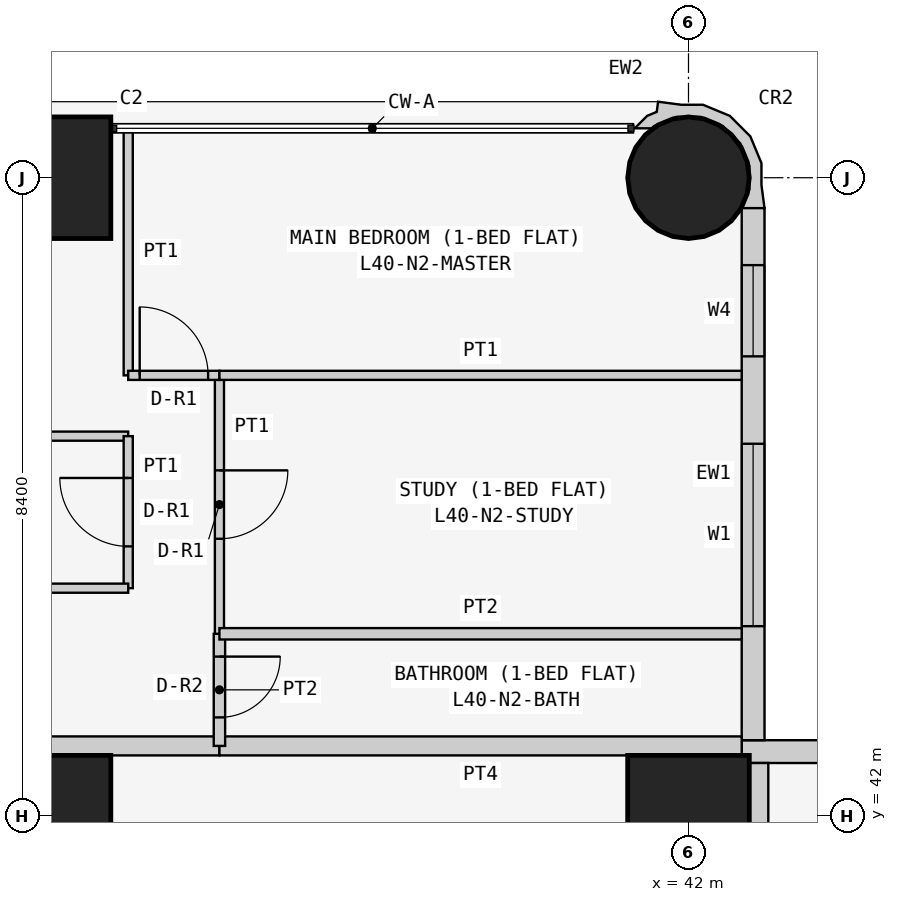
"""IFC4 building model, lengths in metres.
Left out: names, types, materials, properties, quantities, classifications, styles, units other than length and angle.
Written with IfcOpenShell. Run it as: python <this file> out.ifc"""

import sys

from ifc_helpers import new_model, si_unit, direction, frame, frame_2d, origin, origin_2d, place, context, subcontext, project, spatial, polyline, rectangle, circle, outline, extrude, element, fill, save


model = new_model("IFC4")
c1 = context("Model", 3, precision=1e-05, world=origin(), true_north=direction((0.0, 1.0)))
c2 = subcontext(c1, "Body", "Model", "MODEL_VIEW")
j1 = project(units=[si_unit("LENGTHUNIT", "METRE"), si_unit("PLANEANGLEUNIT", "RADIAN")], contexts=[c1])
p1 = place(None, origin())
s1 = spatial("IfcSite", under=j1, at=p1, CompositionType="ELEMENT")
p2 = place(p1, origin())
s2 = spatial("IfcBuilding", under=s1, at=p2, CompositionType="ELEMENT")
p3 = place(p2, frame((0.0, 0.0, 155.7)))
s3 = spatial("IfcBuildingStorey", under=s2, at=p3, CompositionType="ELEMENT", Elevation=155.7)
for number, where, z_axis, x_axis in (
    (1, (33.6, 42.0, 0.0), (0.0, 0.0, 1.0), (1.0, 0.0, 0.0)),
    (2, (33.6, 50.4, 0.0), (0.0, 0.0, 1.0), (1.0, 0.0, 0.0)),
    (3, (42.0, 42.0, 0.0), (0.0, 0.0, 1.0), (1.0, 0.0, 0.0)),
):
    element("IfcColumn", number, at=place(p3, frame(where, z_axis=z_axis, x_axis=x_axis)), inside=s3, PredefinedType="COLUMN", context=c2, shape_type="SweptSolid", body=[
        extrude(rectangle(XDim=1.6, YDim=1.6, at=origin_2d()), origin(), (0.0, 0.0, 1.0), 3.6),
    ])
p4 = place(p3, frame((42.0, 50.4, 0.0), z_axis=(0.0, 0.0, 1.0), x_axis=(1.0, 0.0, 0.0)))
e4 = element("IfcColumn", 4, at=p4, inside=s3, PredefinedType="COLUMN", context=c2, shape_type="SweptSolid", body=[
    extrude(circle(Radius=0.8, at=origin_2d()), origin(), (0.0, 0.0, 1.0), 3.6),
])
p5 = place(p3, frame((58.4, 42.85, 0.0), z_axis=(0.0, 0.0, 1.0), x_axis=(-1.0, 0.0, 0.0)))
e5 = element("IfcWall", 5, at=p5, inside=s3, PredefinedType="SOLIDWALL", context=c2, shape_type="SweptSolid", body=[
    extrude(rectangle(XDim=15.7, YDim=0.3, at=frame_2d((7.85, 0.0))), origin(), (0.0, 0.0, 1.0), 3.45),
])
p6 = place(p5, frame((12.4, 0.0, 0.9)))
e6 = element("IfcOpeningElement", 6, at=p6, cuts=e5, PredefinedType="OPENING", context=c2, shape_type="SweptSolid", body=[
    extrude(rectangle(XDim=1.8, YDim=1.5, at=frame_2d((0.9, 0.75))), frame((0.0, 0.16, 0.0), z_axis=(0.0, -1.0, 0.0), x_axis=(1.0, 0.0, 0.0)), (0.0, 0.0, 1.0), 0.32),
])
p7 = place(p5, frame((9.55, 0.0, 1.5)))
e7 = element("IfcOpeningElement", 7, at=p7, cuts=e5, PredefinedType="OPENING", context=c2, shape_type="SweptSolid", body=[
    extrude(rectangle(XDim=0.9, YDim=0.7, at=frame_2d((0.45, 0.35))), frame((0.0, 0.16, 0.0), z_axis=(0.0, -1.0, 0.0), x_axis=(1.0, 0.0, 0.0)), (0.0, 0.0, 1.0), 0.32),
])
p8 = place(p5, frame((5.1, 0.0, 0.9)))
e8 = element("IfcOpeningElement", 8, at=p8, cuts=e5, PredefinedType="OPENING", context=c2, shape_type="SweptSolid", body=[
    extrude(rectangle(XDim=1.8, YDim=1.5, at=frame_2d((0.9, 0.75))), frame((0.0, 0.16, 0.0), z_axis=(0.0, -1.0, 0.0), x_axis=(1.0, 0.0, 0.0)), (0.0, 0.0, 1.0), 0.32),
])
p9 = place(p5, frame((2.0, 0.0, 0.0)))
e9 = element("IfcOpeningElement", 9, at=p9, cuts=e5, PredefinedType="OPENING", context=c2, shape_type="SweptSolid", body=[
    extrude(rectangle(XDim=0.9, YDim=2.4, at=frame_2d((0.45, 1.2))), frame((0.0, 0.16, 0.0), z_axis=(0.0, -1.0, 0.0), x_axis=(1.0, 0.0, 0.0)), (0.0, 0.0, 1.0), 0.32),
])
p10 = place(p5, frame((0.7, 0.0, 0.9)))
e10 = element("IfcOpeningElement", 10, at=p10, cuts=e5, PredefinedType="OPENING", context=c2, shape_type="SweptSolid", body=[
    extrude(rectangle(XDim=1.2, YDim=1.5, at=frame_2d((0.6, 0.75))), frame((0.0, 0.16, 0.0), z_axis=(0.0, -1.0, 0.0), x_axis=(1.0, 0.0, 0.0)), (0.0, 0.0, 1.0), 0.32),
])
p11 = place(p3, frame((42.85, 43.0, 0.0), z_axis=(0.0, 0.0, 1.0), x_axis=(0.0, 1.0, 0.0)))
e11 = element("IfcWall", 11, at=p11, inside=s3, PredefinedType="SOLIDWALL", context=c2, shape_type="SweptSolid", body=[
    extrude(rectangle(XDim=7.0, YDim=0.3, at=frame_2d((3.5, 0.0))), origin(), (0.0, 0.0, 1.0), 3.45),
])
p12 = place(p11, frame((1.5, 0.0, 0.9)))
e12 = element("IfcOpeningElement", 12, at=p12, cuts=e11, PredefinedType="OPENING", context=c2, shape_type="SweptSolid", body=[
    extrude(rectangle(XDim=2.4, YDim=1.5, at=frame_2d((1.2, 0.75))), frame((0.0, 0.16, 0.0), z_axis=(0.0, -1.0, 0.0), x_axis=(1.0, 0.0, 0.0)), (0.0, 0.0, 1.0), 0.32),
])
p13 = place(p11, frame((5.05, 0.0, 0.9)))
e13 = element("IfcOpeningElement", 13, at=p13, cuts=e11, PredefinedType="OPENING", context=c2, shape_type="SweptSolid", body=[
    extrude(rectangle(XDim=1.2, YDim=1.5, at=frame_2d((0.6, 0.75))), frame((0.0, 0.16, 0.0), z_axis=(0.0, -1.0, 0.0), x_axis=(1.0, 0.0, 0.0)), (0.0, 0.0, 1.0), 0.32),
])
p14 = place(p3, frame((42.817, 50.073, 0.0), z_axis=(0.0, 0.0, 1.0), x_axis=(0.343276641956, 0.93923434088, 0.0)))
e14 = element("IfcWall", 14, at=p14, inside=s3, PredefinedType="SOLIDWALL", context=c2, shape_type="SweptSolid", body=[
    extrude(outline(polyline([(0.266, -0.055), (0.535, 0.044), (0.817, 0.302), (0.978, 0.648), (0.994, 1.03), (0.895, 1.3), (0.828, 1.598), (0.697, 1.569), (0.604, 1.67), (0.394, 1.767), (0.471, 1.556), (0.509, 1.539), (0.724, 1.304), (0.833, 1.005), (0.82, 0.687), (0.686, 0.397), (0.451, 0.182), (0.152, 0.073), (-0.116, 0.084), (-0.128, 0.078), (-0.146, 0.071), (-0.006, -0.197), (0.266, -0.055)])), origin(), (0.0, 0.0, 1.0), 3.45),
])
p15 = place(p3, frame((29.4, 42.925, 0.0), z_axis=(0.0, 0.0, 1.0), x_axis=(1.0, 0.0, 0.0)))
e15 = element("IfcWall", 15, at=p15, inside=s3, PredefinedType="PARTITIONING", context=c2, shape_type="SweptSolid", body=[
    extrude(rectangle(XDim=6.429, YDim=0.25, at=frame_2d((3.215, 0.0))), origin(), (0.0, 0.0, 1.0), 3.45),
])
p16 = place(p15, frame((0.5, 0.0, 0.0)))
e16 = element("IfcOpeningElement", 16, at=p16, cuts=e15, PredefinedType="OPENING", context=c2, shape_type="SweptSolid", body=[
    extrude(rectangle(XDim=1.0, YDim=2.1, at=frame_2d((0.5, 1.05))), frame((0.0, 0.135, 0.0), z_axis=(0.0, -1.0, 0.0), x_axis=(1.0, 0.0, 0.0)), (0.0, 0.0, 1.0), 0.27),
])
p17 = place(p3, frame((35.829, 42.925, 0.0), z_axis=(0.0, 0.0, 1.0), x_axis=(1.0, 0.0, 0.0)))
e17 = element("IfcWall", 17, at=p17, inside=s3, PredefinedType="PARTITIONING", context=c2, shape_type="SweptSolid", body=[
    extrude(rectangle(XDim=6.871, YDim=0.25, at=frame_2d((3.436, 0.0))), origin(), (0.0, 0.0, 1.0), 3.45),
])
p18 = place(p3, frame((42.925, 42.7, 0.0), z_axis=(0.0, 0.0, 1.0), x_axis=(0.0, -1.0, 0.0)))
e18 = element("IfcWall", 18, at=p18, inside=s3, PredefinedType="PARTITIONING", context=c2, shape_type="SweptSolid", body=[
    extrude(rectangle(XDim=6.471, YDim=0.25, at=frame_2d((3.235, 0.0))), origin(), (0.0, 0.0, 1.0), 3.45),
])
p19 = place(p3, frame((29.4, 47.0, 0.0), z_axis=(0.0, 0.0, 1.0), x_axis=(1.0, 0.0, 0.0)))
e19 = element("IfcWall", 19, at=p19, inside=s3, PredefinedType="PARTITIONING", context=c2, shape_type="SweptSolid", body=[
    extrude(rectangle(XDim=5.229, YDim=0.12, at=frame_2d((2.615, 0.0))), origin(), (0.0, 0.0, 1.0), 3.45),
])
p20 = place(p3, frame((34.629, 47.0, 0.0), z_axis=(0.0, 0.0, 1.0), x_axis=(0.0, -1.0, 0.0)))
e20 = element("IfcWall", 20, at=p20, inside=s3, PredefinedType="PARTITIONING", context=c2, shape_type="SweptSolid", body=[
    extrude(rectangle(XDim=2.0, YDim=0.12, at=frame_2d((1.0, 0.0))), origin(), (0.0, 0.0, 1.0), 3.45),
])
p21 = place(p20, frame((0.55, 0.0, 0.0)))
e21 = element("IfcOpeningElement", 21, at=p21, cuts=e20, PredefinedType="OPENING", context=c2, shape_type="SweptSolid", body=[
    extrude(rectangle(XDim=0.9, YDim=2.1, at=frame_2d((0.45, 1.05))), frame((0.0, 0.07, 0.0), z_axis=(0.0, -1.0, 0.0), x_axis=(1.0, 0.0, 0.0)), (0.0, 0.0, 1.0), 0.14),
])
p22 = place(p3, frame((34.629, 45.0, 0.0), z_axis=(0.0, 0.0, 1.0), x_axis=(-1.0, 0.0, 0.0)))
e22 = element("IfcWall", 22, at=p22, inside=s3, PredefinedType="PARTITIONING", context=c2, shape_type="SweptSolid", body=[
    extrude(rectangle(XDim=5.229, YDim=0.12, at=frame_2d((2.615, 0.0))), origin(), (0.0, 0.0, 1.0), 3.45),
])
p23 = place(p3, frame((35.829, 44.4, 0.0), z_axis=(0.0, 0.0, 1.0), x_axis=(0.0, -1.0, 0.0)))
e23 = element("IfcWall", 23, at=p23, inside=s3, PredefinedType="PARTITIONING", context=c2, shape_type="SweptSolid", body=[
    extrude(rectangle(XDim=1.475, YDim=0.15, at=frame_2d((0.737, 0.0))), origin(), (0.0, 0.0, 1.0), 3.45),
])
p24 = place(p23, frame((0.3, 0.0, 0.0)))
e24 = element("IfcOpeningElement", 24, at=p24, cuts=e23, PredefinedType="OPENING", context=c2, shape_type="SweptSolid", body=[
    extrude(rectangle(XDim=0.8, YDim=2.1, at=frame_2d((0.4, 1.05))), frame((0.0, 0.085, 0.0), z_axis=(0.0, -1.0, 0.0), x_axis=(1.0, 0.0, 0.0)), (0.0, 0.0, 1.0), 0.17),
])
p25 = place(p3, frame((35.829, 47.8, 0.0), z_axis=(0.0, 0.0, 1.0), x_axis=(0.0, -1.0, 0.0)))
e25 = element("IfcWall", 25, at=p25, inside=s3, PredefinedType="PARTITIONING", context=c2, shape_type="SweptSolid", body=[
    extrude(rectangle(XDim=3.4, YDim=0.12, at=frame_2d((1.7, 0.0))), origin(), (0.0, 0.0, 1.0), 3.45),
])
p26 = place(p25, frame((1.25, 0.0, 0.0)))
e26 = element("IfcOpeningElement", 26, at=p26, cuts=e25, PredefinedType="OPENING", context=c2, shape_type="SweptSolid", body=[
    extrude(rectangle(XDim=0.9, YDim=2.1, at=frame_2d((0.45, 1.05))), frame((0.0, 0.07, 0.0), z_axis=(0.0, -1.0, 0.0), x_axis=(1.0, 0.0, 0.0)), (0.0, 0.0, 1.0), 0.14),
])
p27 = place(p3, frame((34.629, 51.05, 0.0), z_axis=(0.0, 0.0, 1.0), x_axis=(0.0, -1.0, 0.0)))
e27 = element("IfcWall", 27, at=p27, inside=s3, PredefinedType="PARTITIONING", context=c2, shape_type="SweptSolid", body=[
    extrude(rectangle(XDim=3.25, YDim=0.12, at=frame_2d((1.625, 0.0))), origin(), (0.0, 0.0, 1.0), 3.45),
])
p28 = place(p3, frame((34.629, 47.8, 0.0), z_axis=(0.0, 0.0, 1.0), x_axis=(1.0, 0.0, 0.0)))
e28 = element("IfcWall", 28, at=p28, inside=s3, PredefinedType="PARTITIONING", context=c2, shape_type="SweptSolid", body=[
    extrude(rectangle(XDim=1.2, YDim=0.12, at=frame_2d((0.6, 0.0))), origin(), (0.0, 0.0, 1.0), 3.45),
])
p29 = place(p28, frame((0.151, 0.0, 0.0)))
e29 = element("IfcOpeningElement", 29, at=p29, cuts=e28, PredefinedType="OPENING", context=c2, shape_type="SweptSolid", body=[
    extrude(rectangle(XDim=0.9, YDim=2.1, at=frame_2d((0.45, 1.05))), frame((0.0, 0.07, 0.0), z_axis=(0.0, -1.0, 0.0), x_axis=(1.0, 0.0, 0.0)), (0.0, 0.0, 1.0), 0.14),
])
p30 = place(p3, frame((35.829, 44.4, 0.0), z_axis=(0.0, 0.0, 1.0), x_axis=(1.0, 0.0, 0.0)))
e30 = element("IfcWall", 30, at=p30, inside=s3, PredefinedType="PARTITIONING", context=c2, shape_type="SweptSolid", body=[
    extrude(rectangle(XDim=6.871, YDim=0.15, at=frame_2d((3.436, 0.0))), origin(), (0.0, 0.0, 1.0), 3.45),
])
p31 = place(p3, frame((35.829, 47.8, 0.0), z_axis=(0.0, 0.0, 1.0), x_axis=(1.0, 0.0, 0.0)))
e31 = element("IfcWall", 31, at=p31, inside=s3, PredefinedType="PARTITIONING", context=c2, shape_type="SweptSolid", body=[
    extrude(rectangle(XDim=6.871, YDim=0.12, at=frame_2d((3.436, 0.0))), origin(), (0.0, 0.0, 1.0), 3.45),
])
p32 = place(p12, origin())
e32 = element("IfcWindow", 32, at=p32, inside=s3, PartitioningType="SINGLE_PANEL", PredefinedType="WINDOW", context=c2, shape_type="SweptSolid", body=[
    extrude(rectangle(XDim=2.4, YDim=1.5, at=frame_2d((1.2, 0.75))), frame((0.0, 0.03, 0.0), z_axis=(0.0, -1.0, 0.0), x_axis=(1.0, 0.0, 0.0)), (0.0, 0.0, 1.0), 0.06),
])
fill(e12, e32)
p33 = place(p13, origin())
e33 = element("IfcWindow", 33, at=p33, inside=s3, PartitioningType="SINGLE_PANEL", PredefinedType="WINDOW", context=c2, shape_type="SweptSolid", body=[
    extrude(rectangle(XDim=1.2, YDim=1.5, at=frame_2d((0.6, 0.75))), frame((0.0, 0.03, 0.0), z_axis=(0.0, -1.0, 0.0), x_axis=(1.0, 0.0, 0.0)), (0.0, 0.0, 1.0), 0.06),
])
fill(e13, e33)
p34 = place(p21, frame((0.9, 0.0, 0.0), z_axis=(0.0, 0.0, 1.0), x_axis=(-1.0, 0.0, 0.0)))
e34 = element("IfcDoor", 34, at=p34, inside=s3, OperationType="SINGLE_SWING_RIGHT", PredefinedType="DOOR", context=c2, shape_type="SweptSolid", body=[
    extrude(rectangle(XDim=0.9, YDim=2.1, at=frame_2d((0.45, 1.05))), frame((0.0, 0.025, 0.0), z_axis=(0.0, -1.0, 0.0), x_axis=(1.0, 0.0, 0.0)), (0.0, 0.0, 1.0), 0.05),
])
fill(e21, e34)
p35 = place(p24, origin())
e35 = element("IfcDoor", 35, at=p35, inside=s3, OperationType="SINGLE_SWING_LEFT", PredefinedType="DOOR", context=c2, shape_type="SweptSolid", body=[
    extrude(rectangle(XDim=0.8, YDim=2.1, at=frame_2d((0.4, 1.05))), frame((0.0, 0.025, 0.0), z_axis=(0.0, -1.0, 0.0), x_axis=(1.0, 0.0, 0.0)), (0.0, 0.0, 1.0), 0.05),
])
fill(e24, e35)
p36 = place(p26, origin())
e36 = element("IfcDoor", 36, at=p36, inside=s3, OperationType="SINGLE_SWING_LEFT", PredefinedType="DOOR", context=c2, shape_type="SweptSolid", body=[
    extrude(rectangle(XDim=0.9, YDim=2.1, at=frame_2d((0.45, 1.05))), frame((0.0, 0.025, 0.0), z_axis=(0.0, -1.0, 0.0), x_axis=(1.0, 0.0, 0.0)), (0.0, 0.0, 1.0), 0.05),
])
fill(e26, e36)
p37 = place(p29, origin())
e37 = element("IfcDoor", 37, at=p37, inside=s3, OperationType="SINGLE_SWING_LEFT", PredefinedType="DOOR", context=c2, shape_type="SweptSolid", body=[
    extrude(rectangle(XDim=0.9, YDim=2.1, at=frame_2d((0.45, 1.05))), frame((0.0, 0.025, 0.0), z_axis=(0.0, -1.0, 0.0), x_axis=(1.0, 0.0, 0.0)), (0.0, 0.0, 1.0), 0.05),
])
fill(e29, e37)
save(model, sys.argv[1])
